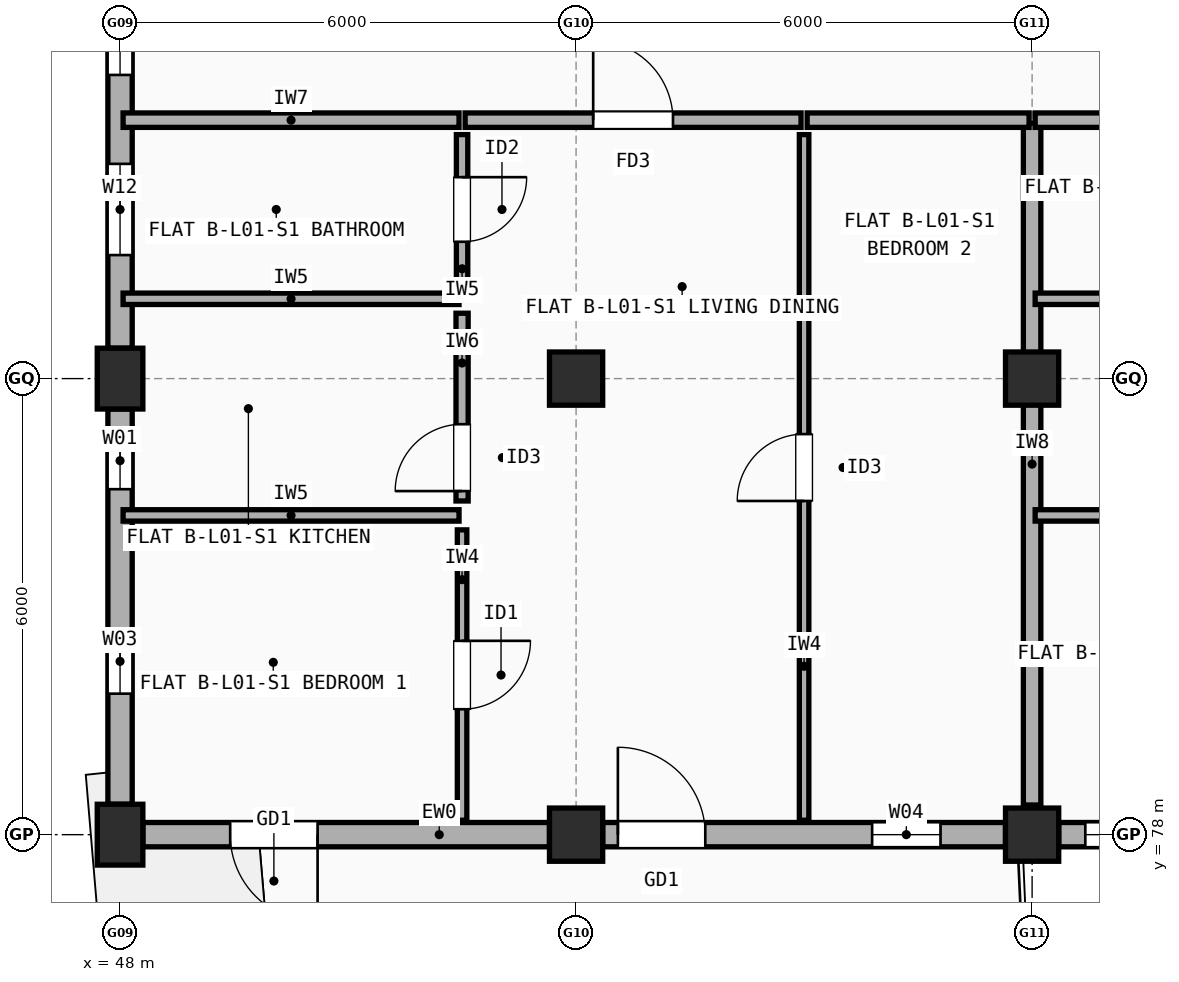
"""IFC4 building model, lengths in metres.
Left out: names, types, materials, properties, quantities, classifications, styles, units other than length and angle.
Written with IfcOpenShell. Run it as: python <this file> out.ifc"""

import sys

from ifc_helpers import new_model, si_unit, direction, frame, frame_2d, origin, origin_2d, place, context, subcontext, project, spatial, rectangle, extrude, element, fill, save


model = new_model("IFC4")
c1 = context("Model", 3, precision=1e-05, world=origin(), true_north=direction((0.0, 1.0)))
c2 = subcontext(c1, "Body", "Model", "MODEL_VIEW")
j1 = project(units=[si_unit("LENGTHUNIT", "METRE"), si_unit("PLANEANGLEUNIT", "RADIAN")], contexts=[c1])
p1 = place(None, origin())
s1 = spatial("IfcSite", under=j1, at=p1, CompositionType="ELEMENT")
p2 = place(p1, origin())
s2 = spatial("IfcBuilding", under=s1, at=p2, CompositionType="ELEMENT")
p3 = place(p2, frame((0.0, 0.0, 4.5)))
s3 = spatial("IfcBuildingStorey", under=s2, at=p3, CompositionType="ELEMENT", Elevation=4.5)
for number, where, z_axis, x_axis in (
    (1, (48.0, 78.0, 0.0), (0.0, 0.0, 1.0), (1.0, 0.0, 0.0)),
    (2, (48.0, 84.0, 0.0), (0.0, 0.0, 1.0), (1.0, 0.0, 0.0)),
):
    element("IfcColumn", number, at=place(p3, frame(where, z_axis=z_axis, x_axis=x_axis)), inside=s3, PredefinedType="COLUMN", context=c2, shape_type="SweptSolid", body=[
        extrude(rectangle(XDim=0.6, YDim=0.8, at=origin_2d()), origin(), (0.0, 0.0, 1.0), 2.945),
    ])
for number, where, z_axis, x_axis in (
    (3, (54.0, 78.0, 0.0), (0.0, 0.0, 1.0), (1.0, 0.0, 0.0)),
    (4, (54.0, 84.0, 0.0), (0.0, 0.0, 1.0), (1.0, 0.0, 0.0)),
    (5, (60.0, 78.0, 0.0), (0.0, 0.0, 1.0), (1.0, 0.0, 0.0)),
    (6, (60.0, 84.0, 0.0), (0.0, 0.0, 1.0), (1.0, 0.0, 0.0)),
):
    element("IfcColumn", number, at=place(p3, frame(where, z_axis=z_axis, x_axis=x_axis)), inside=s3, PredefinedType="COLUMN", context=c2, shape_type="SweptSolid", body=[
        extrude(rectangle(XDim=0.7, YDim=0.7, at=origin_2d()), origin(), (0.0, 0.0, 1.0), 2.945),
    ])
p4 = place(p3, frame((48.3, 78.0, 0.0), z_axis=(0.0, 0.0, 1.0), x_axis=(1.0, 0.0, 0.0)))
e7 = element("IfcWall", 7, at=p4, inside=s3, PredefinedType="STANDARD", context=c2, shape_type="SweptSolid", body=[
    extrude(rectangle(XDim=5.35, YDim=0.32, at=frame_2d((2.675, 0.0))), origin(), (0.0, 0.0, 1.0), 2.427),
])
p5 = place(p4, frame((1.149, 0.0, 0.0)))
e8 = element("IfcOpeningElement", 8, at=p5, cuts=e7, PredefinedType="OPENING", context=c2, shape_type="SweptSolid", body=[
    extrude(rectangle(XDim=1.15, YDim=2.15, at=frame_2d((0.575, 1.075))), frame((0.0, 0.17, 0.0), z_axis=(0.0, -1.0, 0.0), x_axis=(1.0, 0.0, 0.0)), (0.0, 0.0, 1.0), 0.34),
])
p6 = place(p3, frame((54.35, 78.0, 0.0), z_axis=(0.0, 0.0, 1.0), x_axis=(1.0, 0.0, 0.0)))
e9 = element("IfcWall", 9, at=p6, inside=s3, PredefinedType="STANDARD", context=c2, shape_type="SweptSolid", body=[
    extrude(rectangle(XDim=5.3, YDim=0.32, at=frame_2d((2.65, 0.0))), origin(), (0.0, 0.0, 1.0), 2.427),
])
p7 = place(p6, frame((0.2, 0.0, 0.0)))
e10 = element("IfcOpeningElement", 10, at=p7, cuts=e9, PredefinedType="OPENING", context=c2, shape_type="SweptSolid", body=[
    extrude(rectangle(XDim=1.15, YDim=2.15, at=frame_2d((0.575, 1.075))), frame((0.0, 0.17, 0.0), z_axis=(0.0, -1.0, 0.0), x_axis=(1.0, 0.0, 0.0)), (0.0, 0.0, 1.0), 0.34),
])
p8 = place(p6, frame((3.545, 0.0, 0.9)))
e11 = element("IfcOpeningElement", 11, at=p8, cuts=e9, PredefinedType="OPENING", context=c2, shape_type="SweptSolid", body=[
    extrude(rectangle(XDim=0.9, YDim=1.3, at=frame_2d((0.45, 0.65))), frame((0.0, 0.17, 0.0), z_axis=(0.0, -1.0, 0.0), x_axis=(1.0, 0.0, 0.0)), (0.0, 0.0, 1.0), 0.34),
])
p9 = place(p3, frame((60.35, 78.0, 0.0), z_axis=(0.0, 0.0, 1.0), x_axis=(1.0, 0.0, 0.0)))
e12 = element("IfcWall", 12, at=p9, inside=s3, PredefinedType="STANDARD", context=c2, shape_type="SweptSolid", body=[
    extrude(rectangle(XDim=5.3, YDim=0.32, at=frame_2d((2.65, 0.0))), origin(), (0.0, 0.0, 1.0), 2.427),
])
p10 = place(p9, frame((0.35, 0.0, 0.9)))
e13 = element("IfcOpeningElement", 13, at=p10, cuts=e12, PredefinedType="OPENING", context=c2, shape_type="SweptSolid", body=[
    extrude(rectangle(XDim=0.95, YDim=1.35, at=frame_2d((0.475, 0.675))), frame((0.0, 0.17, 0.0), z_axis=(0.0, -1.0, 0.0), x_axis=(1.0, 0.0, 0.0)), (0.0, 0.0, 1.0), 0.34),
])
p11 = place(p9, frame((2.81, 0.0, 0.9)))
e14 = element("IfcOpeningElement", 14, at=p11, cuts=e12, PredefinedType="OPENING", context=c2, shape_type="SweptSolid", body=[
    extrude(rectangle(XDim=0.95, YDim=1.35, at=frame_2d((0.475, 0.675))), frame((0.0, 0.17, 0.0), z_axis=(0.0, -1.0, 0.0), x_axis=(1.0, 0.0, 0.0)), (0.0, 0.0, 1.0), 0.34),
])
p12 = place(p3, frame((48.0, 89.6, 0.0), z_axis=(0.0, 0.0, 1.0), x_axis=(0.0, -1.0, 0.0)))
e15 = element("IfcWall", 15, at=p12, inside=s3, PredefinedType="STANDARD", context=c2, shape_type="SweptSolid", body=[
    extrude(rectangle(XDim=5.2, YDim=0.32, at=frame_2d((2.6, 0.0))), origin(), (0.0, 0.0, 1.0), 2.427),
])
p13 = place(p12, frame((0.555, 0.0, 0.9)))
e16 = element("IfcOpeningElement", 16, at=p13, cuts=e15, PredefinedType="OPENING", context=c2, shape_type="SweptSolid", body=[
    extrude(rectangle(XDim=1.05, YDim=1.35, at=frame_2d((0.525, 0.675))), frame((0.0, 0.17, 0.0), z_axis=(0.0, -1.0, 0.0), x_axis=(1.0, 0.0, 0.0)), (0.0, 0.0, 1.0), 0.34),
])
p14 = place(p12, frame((2.775, 0.0, 0.9)))
e17 = element("IfcOpeningElement", 17, at=p14, cuts=e15, PredefinedType="OPENING", context=c2, shape_type="SweptSolid", body=[
    extrude(rectangle(XDim=1.2, YDim=1.35, at=frame_2d((0.6, 0.675))), frame((0.0, 0.17, 0.0), z_axis=(0.0, -1.0, 0.0), x_axis=(1.0, 0.0, 0.0)), (0.0, 0.0, 1.0), 0.34),
])
p15 = place(p3, frame((48.0, 83.6, 0.0), z_axis=(0.0, 0.0, 1.0), x_axis=(0.0, -1.0, 0.0)))
e18 = element("IfcWall", 18, at=p15, inside=s3, PredefinedType="STANDARD", context=c2, shape_type="SweptSolid", body=[
    extrude(rectangle(XDim=5.2, YDim=0.32, at=frame_2d((2.6, 0.0))), origin(), (0.0, 0.0, 1.0), 2.427),
])
p16 = place(p15, frame((0.305, 0.0, 0.9)))
e19 = element("IfcOpeningElement", 19, at=p16, cuts=e18, PredefinedType="OPENING", context=c2, shape_type="SweptSolid", body=[
    extrude(rectangle(XDim=0.75, YDim=1.15, at=frame_2d((0.375, 0.575))), frame((0.0, 0.17, 0.0), z_axis=(0.0, -1.0, 0.0), x_axis=(1.0, 0.0, 0.0)), (0.0, 0.0, 1.0), 0.34),
])
p17 = place(p15, frame((2.895, 0.0, 0.9)))
e20 = element("IfcOpeningElement", 20, at=p17, cuts=e18, PredefinedType="OPENING", context=c2, shape_type="SweptSolid", body=[
    extrude(rectangle(XDim=0.85, YDim=1.25, at=frame_2d((0.425, 0.625))), frame((0.0, 0.17, 0.0), z_axis=(0.0, -1.0, 0.0), x_axis=(1.0, 0.0, 0.0)), (0.0, 0.0, 1.0), 0.34),
])
p18 = place(p3, frame((60.0, 78.39, 0.0), z_axis=(0.0, 0.0, 1.0), x_axis=(0.0, 1.0, 0.0)))
e21 = element("IfcWall", 21, at=p18, inside=s3, PredefinedType="SOLIDWALL", context=c2, shape_type="SweptSolid", body=[
    extrude(rectangle(XDim=8.97, YDim=0.23, at=frame_2d((4.485, 0.0))), origin(), (0.0, 0.0, 1.0), 2.327),
])
p19 = place(p3, frame((48.04, 87.4, 0.0), z_axis=(0.0, 0.0, 1.0), x_axis=(1.0, 0.0, 0.0)))
e22 = element("IfcWall", 22, at=p19, inside=s3, PredefinedType="SOLIDWALL", context=c2, shape_type="SweptSolid", body=[
    extrude(rectangle(XDim=4.42, YDim=0.19, at=frame_2d((2.21, 0.0))), origin(), (0.0, 0.0, 1.0), 2.427),
])
p20 = place(p3, frame((52.54, 87.4, 0.0), z_axis=(0.0, 0.0, 1.0), x_axis=(1.0, 0.0, 0.0)))
e23 = element("IfcWall", 23, at=p20, inside=s3, PredefinedType="SOLIDWALL", context=c2, shape_type="SweptSolid", body=[
    extrude(rectangle(XDim=4.42, YDim=0.19, at=frame_2d((2.21, 0.0))), origin(), (0.0, 0.0, 1.0), 2.327),
])
p21 = place(p20, frame((1.685, 0.0, 0.0)))
e24 = element("IfcOpeningElement", 24, at=p21, cuts=e23, PredefinedType="OPENING", context=c2, shape_type="SweptSolid", body=[
    extrude(rectangle(XDim=1.05, YDim=2.15, at=frame_2d((0.525, 1.075))), frame((0.0, 0.105, 0.0), z_axis=(0.0, -1.0, 0.0), x_axis=(1.0, 0.0, 0.0)), (0.0, 0.0, 1.0), 0.21),
])
p22 = place(p3, frame((52.5, 78.19, 0.0), z_axis=(0.0, 0.0, 1.0), x_axis=(0.0, 1.0, 0.0)))
e25 = element("IfcWall", 25, at=p22, inside=s3, PredefinedType="PARTITIONING", context=c2, shape_type="SweptSolid", body=[
    extrude(rectangle(XDim=3.82, YDim=0.125, at=frame_2d((1.91, 0.0))), origin(), (0.0, 0.0, 1.0), 2.945),
])
p23 = place(p22, frame((1.46, 0.0, 0.0)))
e26 = element("IfcOpeningElement", 26, at=p23, cuts=e25, PredefinedType="OPENING", context=c2, shape_type="SweptSolid", body=[
    extrude(rectangle(XDim=0.9, YDim=2.1, at=frame_2d((0.45, 1.05))), frame((0.0, 0.073, 0.0), z_axis=(0.0, -1.0, 0.0), x_axis=(1.0, 0.0, 0.0)), (0.0, 0.0, 1.0), 0.145),
])
p24 = place(p3, frame((52.5, 82.39, 0.0), z_axis=(0.0, 0.0, 1.0), x_axis=(0.0, 1.0, 0.0)))
e27 = element("IfcWall", 27, at=p24, inside=s3, PredefinedType="PLUMBINGWALL", context=c2, shape_type="SweptSolid", body=[
    extrude(rectangle(XDim=2.47, YDim=0.16, at=frame_2d((1.235, 0.0))), origin(), (0.0, 0.0, 1.0), 2.427),
])
p25 = place(p24, frame((0.13, 0.0, 0.0)))
e28 = element("IfcOpeningElement", 28, at=p25, cuts=e27, PredefinedType="OPENING", context=c2, shape_type="SweptSolid", body=[
    extrude(rectangle(XDim=0.88, YDim=2.1, at=frame_2d((0.44, 1.05))), frame((0.0, 0.09, 0.0), z_axis=(0.0, -1.0, 0.0), x_axis=(1.0, 0.0, 0.0)), (0.0, 0.0, 1.0), 0.18),
])
p26 = place(p3, frame((52.5, 85.24, 0.0), z_axis=(0.0, 0.0, 1.0), x_axis=(0.0, 1.0, 0.0)))
e29 = element("IfcWall", 29, at=p26, inside=s3, PredefinedType="PARTITIONING", context=c2, shape_type="SweptSolid", body=[
    extrude(rectangle(XDim=1.97, YDim=0.15, at=frame_2d((0.985, 0.0))), origin(), (0.0, 0.0, 1.0), 2.945),
])
p27 = place(p26, frame((0.56, 0.0, 0.0)))
e30 = element("IfcOpeningElement", 30, at=p27, cuts=e29, PredefinedType="OPENING", context=c2, shape_type="SweptSolid", body=[
    extrude(rectangle(XDim=0.85, YDim=2.1, at=frame_2d((0.425, 1.05))), frame((0.0, 0.085, 0.0), z_axis=(0.0, -1.0, 0.0), x_axis=(1.0, 0.0, 0.0)), (0.0, 0.0, 1.0), 0.17),
])
for number, where, z_axis, x_axis in (
    (31, (48.04, 82.2, 0.0), (0.0, 0.0, 1.0), (1.0, 0.0, 0.0)),
    (32, (48.04, 85.05, 0.0), (0.0, 0.0, 1.0), (1.0, 0.0, 0.0)),
):
    element("IfcWall", number, at=place(p3, frame(where, z_axis=z_axis, x_axis=x_axis)), inside=s3, PredefinedType="PARTITIONING", context=c2, shape_type="SweptSolid", body=[
        extrude(rectangle(XDim=4.42, YDim=0.15, at=frame_2d((2.21, 0.0))), origin(), (0.0, 0.0, 1.0), 2.427),
    ])
p28 = place(p3, frame((57.04, 87.4, 0.0), z_axis=(0.0, 0.0, 1.0), x_axis=(1.0, 0.0, 0.0)))
e33 = element("IfcWall", 33, at=p28, inside=s3, PredefinedType="SOLIDWALL", context=c2, shape_type="SweptSolid", body=[
    extrude(rectangle(XDim=2.92, YDim=0.19, at=frame_2d((1.46, 0.0))), origin(), (0.0, 0.0, 1.0), 2.327),
])
p29 = place(p3, frame((57.0, 78.19, 0.0), z_axis=(0.0, 0.0, 1.0), x_axis=(0.0, 1.0, 0.0)))
e34 = element("IfcWall", 34, at=p29, inside=s3, PredefinedType="PARTITIONING", context=c2, shape_type="SweptSolid", body=[
    extrude(rectangle(XDim=9.02, YDim=0.125, at=frame_2d((4.51, 0.0))), origin(), (0.0, 0.0, 1.0), 2.427),
])
p30 = place(p29, frame((4.2, 0.0, 0.0)))
e35 = element("IfcOpeningElement", 35, at=p30, cuts=e34, PredefinedType="OPENING", context=c2, shape_type="SweptSolid", body=[
    extrude(rectangle(XDim=0.88, YDim=2.1, at=frame_2d((0.44, 1.05))), frame((0.0, 0.073, 0.0), z_axis=(0.0, -1.0, 0.0), x_axis=(1.0, 0.0, 0.0)), (0.0, 0.0, 1.0), 0.145),
])
p31 = place(p3, frame((60.04, 87.4, 0.0), z_axis=(0.0, 0.0, 1.0), x_axis=(1.0, 0.0, 0.0)))
e36 = element("IfcWall", 36, at=p31, inside=s3, PredefinedType="SOLIDWALL", context=c2, shape_type="SweptSolid", body=[
    extrude(rectangle(XDim=4.42, YDim=0.19, at=frame_2d((2.21, 0.0))), origin(), (0.0, 0.0, 1.0), 2.327),
])
for number, where, z_axis, x_axis in (
    (37, (60.04, 82.2, 0.0), (0.0, 0.0, 1.0), (1.0, 0.0, 0.0)),
    (38, (60.04, 85.05, 0.0), (0.0, 0.0, 1.0), (1.0, 0.0, 0.0)),
):
    element("IfcWall", number, at=place(p3, frame(where, z_axis=z_axis, x_axis=x_axis)), inside=s3, PredefinedType="PARTITIONING", context=c2, shape_type="SweptSolid", body=[
        extrude(rectangle(XDim=4.42, YDim=0.15, at=frame_2d((2.21, 0.0))), origin(), (0.0, 0.0, 1.0), 2.327),
    ])
p32 = place(p5, frame((1.15, 0.0, 0.0), z_axis=(0.0, 0.0, 1.0), x_axis=(-1.0, 0.0, 0.0)))
e39 = element("IfcDoor", 39, at=p32, inside=s3, OperationType="SINGLE_SWING_RIGHT", PredefinedType="DOOR", context=c2, shape_type="SweptSolid", body=[
    extrude(rectangle(XDim=1.15, YDim=2.15, at=frame_2d((0.575, 1.075))), frame((0.0, 0.025, 0.0), z_axis=(0.0, -1.0, 0.0), x_axis=(1.0, 0.0, 0.0)), (0.0, 0.0, 1.0), 0.05),
])
fill(e8, e39)
p33 = place(p7, frame((1.15, 0.0, 0.0), z_axis=(0.0, 0.0, 1.0), x_axis=(-1.0, 0.0, 0.0)))
e40 = element("IfcDoor", 40, at=p33, inside=s3, OperationType="SINGLE_SWING_LEFT", PredefinedType="DOOR", context=c2, shape_type="SweptSolid", body=[
    extrude(rectangle(XDim=1.15, YDim=2.15, at=frame_2d((0.575, 1.075))), frame((0.0, 0.025, 0.0), z_axis=(0.0, -1.0, 0.0), x_axis=(1.0, 0.0, 0.0)), (0.0, 0.0, 1.0), 0.05),
])
fill(e10, e40)
p34 = place(p8, origin())
e41 = element("IfcWindow", 41, at=p34, inside=s3, PartitioningType="SINGLE_PANEL", PredefinedType="WINDOW", context=c2, shape_type="SweptSolid", body=[
    extrude(rectangle(XDim=0.9, YDim=1.3, at=frame_2d((0.45, 0.65))), frame((0.0, 0.03, 0.0), z_axis=(0.0, -1.0, 0.0), x_axis=(1.0, 0.0, 0.0)), (0.0, 0.0, 1.0), 0.06),
])
fill(e11, e41)
p35 = place(p10, origin())
e42 = element("IfcWindow", 42, at=p35, inside=s3, PartitioningType="SINGLE_PANEL", PredefinedType="WINDOW", context=c2, shape_type="SweptSolid", body=[
    extrude(rectangle(XDim=0.95, YDim=1.35, at=frame_2d((0.475, 0.675))), frame((0.0, 0.03, 0.0), z_axis=(0.0, -1.0, 0.0), x_axis=(1.0, 0.0, 0.0)), (0.0, 0.0, 1.0), 0.06),
])
fill(e13, e42)
p36 = place(p13, origin())
e43 = element("IfcWindow", 43, at=p36, inside=s3, PartitioningType="SINGLE_PANEL", PredefinedType="WINDOW", context=c2, shape_type="SweptSolid", body=[
    extrude(rectangle(XDim=1.05, YDim=1.35, at=frame_2d((0.525, 0.675))), frame((0.0, 0.03, 0.0), z_axis=(0.0, -1.0, 0.0), x_axis=(1.0, 0.0, 0.0)), (0.0, 0.0, 1.0), 0.06),
])
fill(e16, e43)
p37 = place(p14, origin())
e44 = element("IfcWindow", 44, at=p37, inside=s3, PartitioningType="SINGLE_PANEL", PredefinedType="WINDOW", context=c2, shape_type="SweptSolid", body=[
    extrude(rectangle(XDim=1.2, YDim=1.35, at=frame_2d((0.6, 0.675))), frame((0.0, 0.03, 0.0), z_axis=(0.0, -1.0, 0.0), x_axis=(1.0, 0.0, 0.0)), (0.0, 0.0, 1.0), 0.06),
])
fill(e17, e44)
p38 = place(p16, origin())
e45 = element("IfcWindow", 45, at=p38, inside=s3, PartitioningType="SINGLE_PANEL", PredefinedType="WINDOW", context=c2, shape_type="SweptSolid", body=[
    extrude(rectangle(XDim=0.75, YDim=1.15, at=frame_2d((0.375, 0.575))), frame((0.0, 0.03, 0.0), z_axis=(0.0, -1.0, 0.0), x_axis=(1.0, 0.0, 0.0)), (0.0, 0.0, 1.0), 0.06),
])
fill(e19, e45)
p39 = place(p17, origin())
e46 = element("IfcWindow", 46, at=p39, inside=s3, PartitioningType="SINGLE_PANEL", PredefinedType="WINDOW", context=c2, shape_type="SweptSolid", body=[
    extrude(rectangle(XDim=0.85, YDim=1.25, at=frame_2d((0.425, 0.625))), frame((0.0, 0.03, 0.0), z_axis=(0.0, -1.0, 0.0), x_axis=(1.0, 0.0, 0.0)), (0.0, 0.0, 1.0), 0.06),
])
fill(e20, e46)
p40 = place(p21, origin())
e47 = element("IfcDoor", 47, at=p40, inside=s3, OperationType="SINGLE_SWING_LEFT", PredefinedType="DOOR", context=c2, shape_type="SweptSolid", body=[
    extrude(rectangle(XDim=1.05, YDim=2.15, at=frame_2d((0.525, 1.075))), frame((0.0, 0.025, 0.0), z_axis=(0.0, -1.0, 0.0), x_axis=(1.0, 0.0, 0.0)), (0.0, 0.0, 1.0), 0.05),
])
fill(e24, e47)
p41 = place(p23, origin())
e48 = element("IfcDoor", 48, at=p41, inside=s3, OperationType="SINGLE_SWING_RIGHT", PredefinedType="DOOR", context=c2, shape_type="SweptSolid", body=[
    extrude(rectangle(XDim=0.9, YDim=2.1, at=frame_2d((0.45, 1.05))), frame((0.0, 0.025, 0.0), z_axis=(0.0, -1.0, 0.0), x_axis=(1.0, 0.0, 0.0)), (0.0, 0.0, 1.0), 0.05),
])
fill(e26, e48)
p42 = place(p25, origin())
e49 = element("IfcDoor", 49, at=p42, inside=s3, OperationType="SINGLE_SWING_LEFT", PredefinedType="DOOR", context=c2, shape_type="SweptSolid", body=[
    extrude(rectangle(XDim=0.88, YDim=2.1, at=frame_2d((0.44, 1.05))), frame((0.0, 0.025, 0.0), z_axis=(0.0, -1.0, 0.0), x_axis=(1.0, 0.0, 0.0)), (0.0, 0.0, 1.0), 0.05),
])
fill(e28, e49)
p43 = place(p27, origin())
e50 = element("IfcDoor", 50, at=p43, inside=s3, OperationType="SINGLE_SWING_RIGHT", PredefinedType="DOOR", context=c2, shape_type="SweptSolid", body=[
    extrude(rectangle(XDim=0.85, YDim=2.1, at=frame_2d((0.425, 1.05))), frame((0.0, 0.025, 0.0), z_axis=(0.0, -1.0, 0.0), x_axis=(1.0, 0.0, 0.0)), (0.0, 0.0, 1.0), 0.05),
])
fill(e30, e50)
p44 = place(p30, origin())
e51 = element("IfcDoor", 51, at=p44, inside=s3, OperationType="SINGLE_SWING_LEFT", PredefinedType="DOOR", context=c2, shape_type="SweptSolid", body=[
    extrude(rectangle(XDim=0.88, YDim=2.1, at=frame_2d((0.44, 1.05))), frame((0.0, 0.025, 0.0), z_axis=(0.0, -1.0, 0.0), x_axis=(1.0, 0.0, 0.0)), (0.0, 0.0, 1.0), 0.05),
])
fill(e35, e51)
save(model, sys.argv[1])
